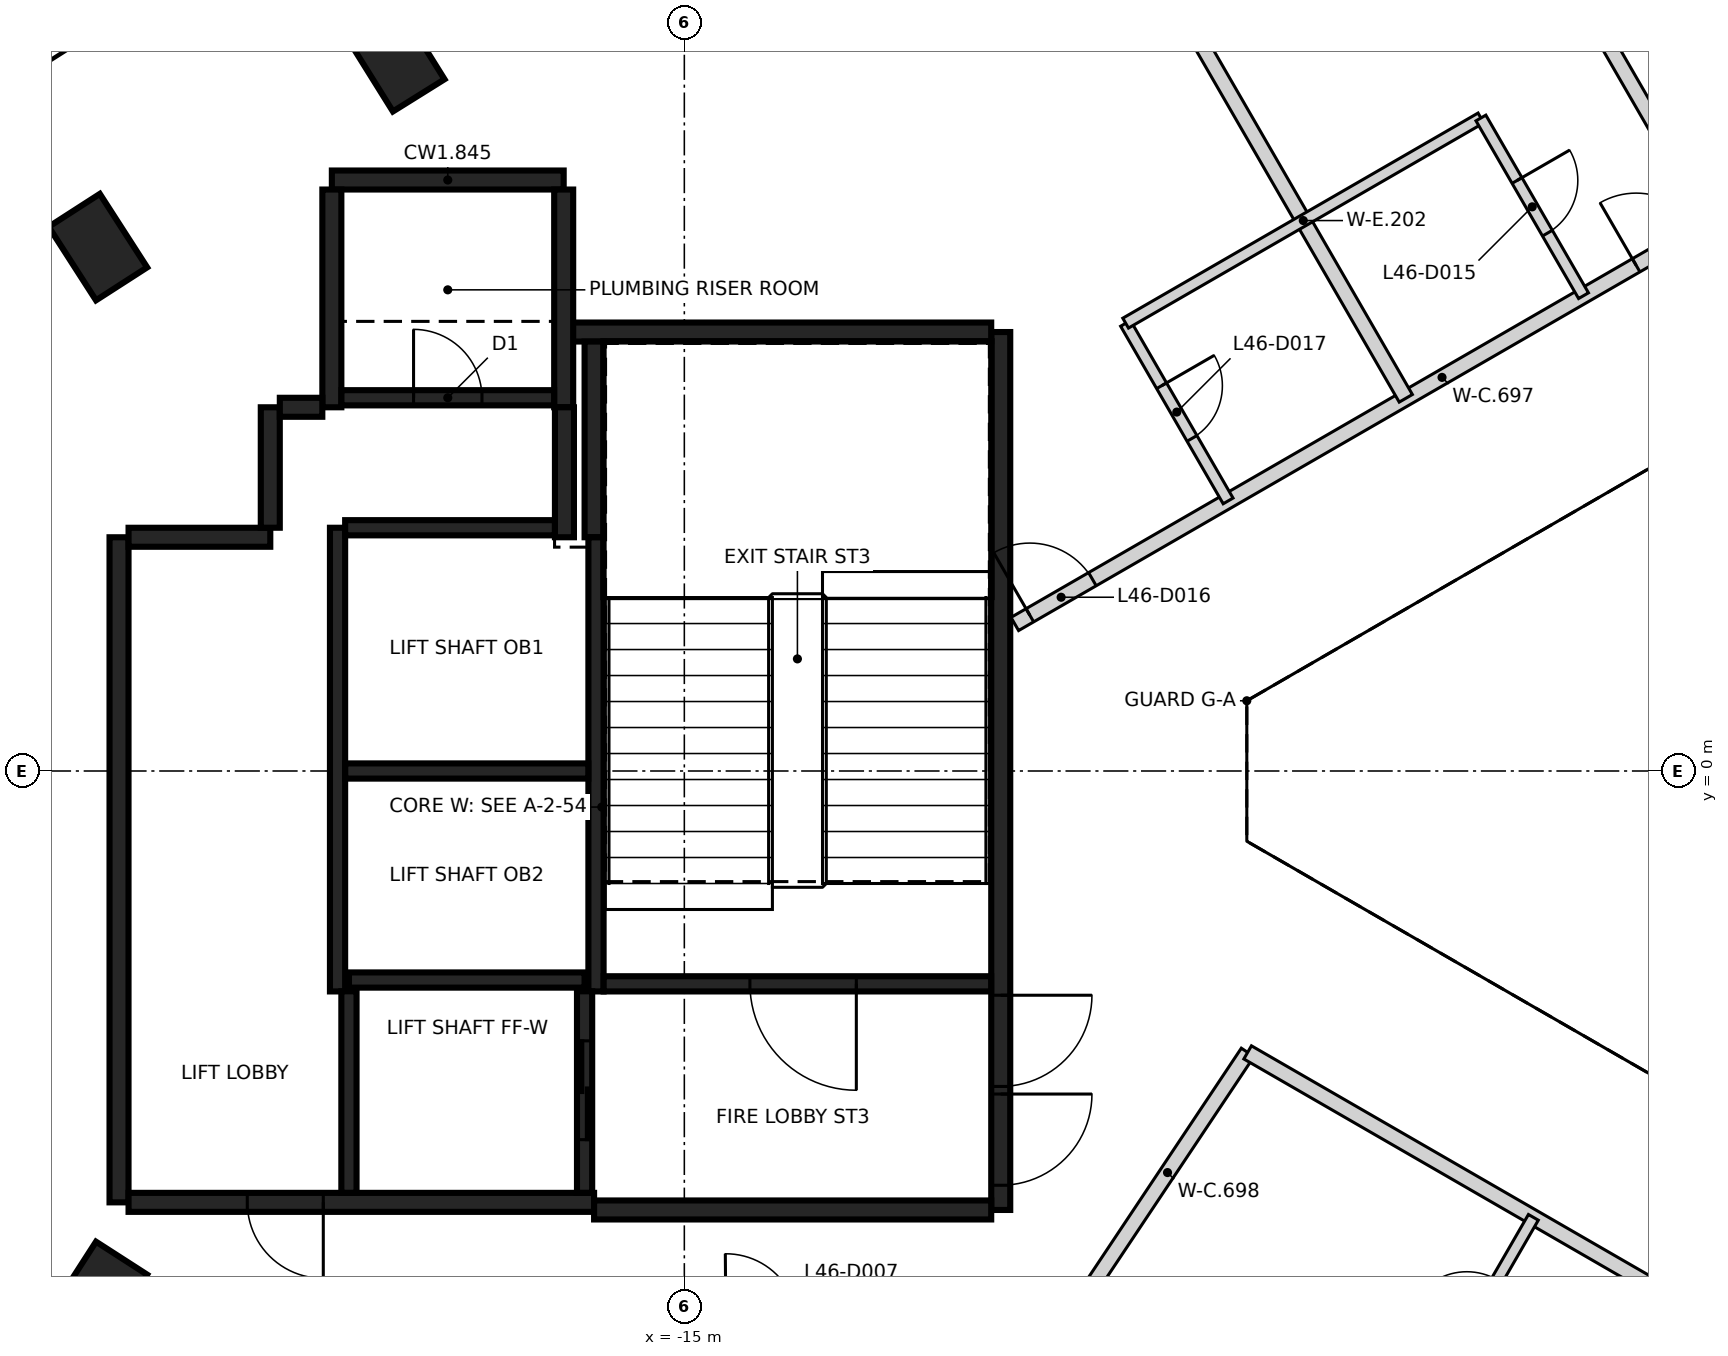
"""IFC4 building model, lengths in metres.
Left out: names, types, materials, properties, quantities, classifications, styles, units other than length and angle.
Written with IfcOpenShell. Run it as: python <this file> out.ifc"""

import sys

from ifc_helpers import new_model, si_unit, direction, frame, frame_2d, origin, origin_2d, place, context, subcontext, project, spatial, rectangle, extrude, element, fill, save


model = new_model("IFC4")
c1 = context("Model", 3, precision=1e-05, world=origin(), true_north=direction((0.0, 1.0)))
c2 = subcontext(c1, "Body", "Model", "MODEL_VIEW")
j1 = project(units=[si_unit("LENGTHUNIT", "METRE"), si_unit("PLANEANGLEUNIT", "RADIAN")], contexts=[c1])
p1 = place(None, origin())
s1 = spatial("IfcSite", under=j1, at=p1, CompositionType="ELEMENT")
p2 = place(p1, origin())
s2 = spatial("IfcBuilding", under=s1, at=p2, CompositionType="ELEMENT")
p3 = place(p2, frame((0.0, 0.0, 186.4)))
s3 = spatial("IfcBuildingStorey", under=s2, at=p3, CompositionType="ELEMENT", Elevation=186.4)
for number, where, z_axis, x_axis in (
    (1, (-18.799, 9.376, -0.35), (0.0, 0.0, 1.0), (-0.529, 0.848, 0.0)),
    (2, (-22.715, 6.892, -0.35), (0.0, 0.0, 1.0), (-0.541, 0.841, 0.0)),
    (3, (-22.715, -6.892, -0.35), (0.0, 0.0, 1.0), (0.541, 0.841, 0.0)),
):
    element("IfcColumn", number, at=place(p3, frame(where, z_axis=z_axis, x_axis=x_axis)), inside=s3, PredefinedType="COLUMN", context=c2, shape_type="SweptSolid", body=[
        extrude(rectangle(XDim=1.15, YDim=0.8, at=origin_2d()), origin(), (0.0, 0.0, 1.0), 3.6),
    ])
p4 = place(p3, frame((-10.837, 5.775, 0.0), z_axis=(0.0, 0.0, 1.0), x_axis=(0.0, -1.0, 0.0)))
e4 = element("IfcWall", 4, at=p4, inside=s3, PredefinedType="SHEAR", context=c2, shape_type="SweptSolid", body=[
    extrude(rectangle(XDim=11.55, YDim=0.25, at=frame_2d((5.775, 0.0))), origin(), (0.0, 0.0, 1.0), 3.25),
])
p5 = place(p4, frame((10.025, 0.0, 0.0)))
e5 = element("IfcOpeningElement", 5, at=p5, cuts=e4, PredefinedType="OPENING", context=c2, shape_type="SweptSolid", body=[
    extrude(rectangle(XDim=1.2, YDim=2.1, at=frame_2d((0.6, 1.05))), frame((0.0, 0.135, 0.0), z_axis=(0.0, -1.0, 0.0), x_axis=(1.0, 0.0, 0.0)), (0.0, 0.0, 1.0), 0.27),
])
p6 = place(p4, frame((8.725, 0.0, 0.0)))
e6 = element("IfcOpeningElement", 6, at=p6, cuts=e4, PredefinedType="OPENING", context=c2, shape_type="SweptSolid", body=[
    extrude(rectangle(XDim=1.2, YDim=2.1, at=frame_2d((0.6, 1.05))), frame((0.0, 0.135, 0.0), z_axis=(0.0, -1.0, 0.0), x_axis=(1.0, 0.0, 0.0)), (0.0, 0.0, 1.0), 0.27),
])
p7 = place(p3, frame((-22.437, -5.675, 0.0), z_axis=(0.0, 0.0, 1.0), x_axis=(0.0, 1.0, 0.0)))
e7 = element("IfcWall", 7, at=p7, inside=s3, PredefinedType="SHEAR", context=c2, shape_type="SweptSolid", body=[
    extrude(rectangle(XDim=8.75, YDim=0.25, at=frame_2d((4.375, 0.0))), origin(), (0.0, 0.0, 1.0), 3.25),
])
p8 = place(p3, frame((-16.187, -5.675, 0.0), z_axis=(0.0, 0.0, 1.0), x_axis=(-1.0, 0.0, 0.0)))
e8 = element("IfcWall", 8, at=p8, inside=s3, PredefinedType="SHEAR", context=c2, shape_type="SweptSolid", body=[
    extrude(rectangle(XDim=6.125, YDim=0.25, at=frame_2d((3.062, 0.0))), origin(), (0.0, 0.0, 1.0), 3.25),
])
p9 = place(p8, frame((3.563, 0.0, 0.0)))
e9 = element("IfcOpeningElement", 9, at=p9, cuts=e8, PredefinedType="OPENING", context=c2, shape_type="SweptSolid", body=[
    extrude(rectangle(XDim=1.0, YDim=2.1, at=frame_2d((0.5, 1.05))), frame((0.0, 0.135, 0.0), z_axis=(0.0, -1.0, 0.0), x_axis=(1.0, 0.0, 0.0)), (0.0, 0.0, 1.0), 0.27),
])
p10 = place(p3, frame((-10.963, -5.775, 0.0), z_axis=(0.0, 0.0, 1.0), x_axis=(-1.0, 0.0, 0.0)))
e10 = element("IfcWall", 10, at=p10, inside=s3, PredefinedType="SHEAR", context=c2, shape_type="SweptSolid", body=[
    extrude(rectangle(XDim=5.225, YDim=0.25, at=frame_2d((2.612, 0.0))), origin(), (0.0, 0.0, 1.0), 3.25),
])
p11 = place(p3, frame((-16.472, 5.775, 0.0), z_axis=(0.0, 0.0, 1.0), x_axis=(1.0, 0.0, 0.0)))
e11 = element("IfcWall", 11, at=p11, inside=s3, PredefinedType="SHEAR", context=c2, shape_type="SweptSolid", body=[
    extrude(rectangle(XDim=5.51, YDim=0.25, at=frame_2d((2.755, 0.0))), origin(), (0.0, 0.0, 1.0), 3.25),
])
p12 = place(p3, frame((-19.637, 7.775, 0.0), z_axis=(0.0, 0.0, 1.0), x_axis=(1.0, 0.0, 0.0)))
e12 = element("IfcWall", 12, at=p12, inside=s3, PredefinedType="SHEAR", context=c2, shape_type="SweptSolid", body=[
    extrude(rectangle(XDim=3.05, YDim=0.25, at=frame_2d((1.525, 0.0))), origin(), (0.0, 0.0, 1.0), 3.25),
])
for number, where, z_axis, x_axis in (
    (13, (-16.587, 7.65, 0.0), (0.0, 0.0, 1.0), (0.0, -1.0, 0.0)),
    (14, (-19.637, 4.785, 0.0), (0.0, 0.0, 1.0), (0.0, 1.0, 0.0)),
):
    element("IfcWall", number, at=place(p3, frame(where, z_axis=z_axis, x_axis=x_axis)), inside=s3, PredefinedType="SHEAR", context=c2, shape_type="SweptSolid", body=[
        extrude(rectangle(XDim=2.865, YDim=0.25, at=frame_2d((1.432, 0.0))), origin(), (0.0, 0.0, 1.0), 3.25),
    ])
p13 = place(p3, frame((-16.187, 3.075, 0.0), z_axis=(0.0, 0.0, 1.0), x_axis=(0.0, 1.0, 0.0)))
e15 = element("IfcWall", 15, at=p13, inside=s3, PredefinedType="SHEAR", context=c2, shape_type="SweptSolid", body=[
    extrude(rectangle(XDim=2.575, YDim=0.25, at=frame_2d((1.287, 0.0))), origin(), (0.0, 0.0, 1.0), 3.25),
])
p14 = place(p3, frame((-22.312, 3.075, 0.0), z_axis=(0.0, 0.0, 1.0), x_axis=(1.0, 0.0, 0.0)))
e16 = element("IfcWall", 16, at=p14, inside=s3, PredefinedType="SHEAR", context=c2, shape_type="SweptSolid", body=[
    extrude(rectangle(XDim=1.865, YDim=0.25, at=frame_2d((0.932, 0.0))), origin(), (0.0, 0.0, 1.0), 3.25),
])
p15 = place(p3, frame((-16.577, 4.785, 0.0), z_axis=(0.0, 0.0, 1.0), x_axis=(0.0, -1.0, 0.0)))
e17 = element("IfcWall", 17, at=p15, inside=s3, PredefinedType="SHEAR", context=c2, shape_type="SweptSolid", body=[
    extrude(rectangle(XDim=1.71, YDim=0.25, at=frame_2d((0.855, 0.0))), origin(), (0.0, 0.0, 1.0), 3.25),
])
p16 = place(p3, frame((-20.447, 3.2, 0.0), z_axis=(0.0, 0.0, 1.0), x_axis=(0.0, 1.0, 0.0)))
e18 = element("IfcWall", 18, at=p16, inside=s3, PredefinedType="SHEAR", context=c2, shape_type="SweptSolid", body=[
    extrude(rectangle(XDim=1.584, YDim=0.25, at=frame_2d((0.792, 0.0))), origin(), (0.0, 0.0, 1.0), 3.25),
])
p17 = place(p3, frame((-20.322, 4.785, 0.0), z_axis=(0.0, 0.0, 1.0), x_axis=(1.0, 0.0, 0.0)))
e19 = element("IfcWall", 19, at=p17, inside=s3, PredefinedType="SHEAR", context=c2, shape_type="SweptSolid", body=[
    extrude(rectangle(XDim=0.559, YDim=0.25, at=frame_2d((0.28, 0.0))), origin(), (0.0, 0.0, 1.0), 3.25),
])
p18 = place(p3, frame((-16.162, 3.074, 0.0), z_axis=(0.0, 0.0, 1.0), x_axis=(0.0, -1.0, 0.0)))
e20 = element("IfcWall", 20, at=p18, inside=s3, PredefinedType="SHEAR", context=c2, shape_type="SweptSolid", body=[
    extrude(rectangle(XDim=5.974, YDim=0.2, at=frame_2d((2.987, 0.0))), origin(), (0.0, 0.0, 1.0), 3.25),
])
p19 = place(p3, frame((-19.562, -2.9, 0.0), z_axis=(0.0, 0.0, 1.0), x_axis=(0.0, 1.0, 0.0)))
e21 = element("IfcWall", 21, at=p19, inside=s3, PredefinedType="SHEAR", context=c2, shape_type="SweptSolid", body=[
    extrude(rectangle(XDim=6.1, YDim=0.2, at=frame_2d((3.05, 0.0))), origin(), (0.0, 0.0, 1.0), 3.25),
])
p20 = place(p3, frame((-10.963, -2.8, 0.0), z_axis=(0.0, 0.0, 1.0), x_axis=(-1.0, 0.0, 0.0)))
e22 = element("IfcWall", 22, at=p20, inside=s3, PredefinedType="SHEAR", context=c2, shape_type="SweptSolid", body=[
    extrude(rectangle(XDim=5.098, YDim=0.2, at=frame_2d((2.549, 0.0))), origin(), (0.0, 0.0, 1.0), 3.25),
])
p21 = place(p20, frame((1.774, 0.0, 0.0)))
e23 = element("IfcOpeningElement", 23, at=p21, cuts=e22, PredefinedType="OPENING", context=c2, shape_type="SweptSolid", body=[
    extrude(rectangle(XDim=1.4, YDim=2.1, at=frame_2d((0.7, 1.05))), frame((0.0, 0.11, 0.0), z_axis=(0.0, -1.0, 0.0), x_axis=(1.0, 0.0, 0.0)), (0.0, 0.0, 1.0), 0.22),
])
p22 = place(p3, frame((-16.263, 0.0, 0.0), z_axis=(0.0, 0.0, 1.0), x_axis=(-1.0, 0.0, 0.0)))
e24 = element("IfcWall", 24, at=p22, inside=s3, PredefinedType="SHEAR", context=c2, shape_type="SweptSolid", body=[
    extrude(rectangle(XDim=3.198, YDim=0.2, at=frame_2d((1.599, 0.0))), origin(), (0.0, 0.0, 1.0), 3.25),
])
p23 = place(p3, frame((-19.511, 4.91, 0.0), z_axis=(0.0, 0.0, 1.0), x_axis=(1.0, 0.0, 0.0)))
e25 = element("IfcWall", 25, at=p23, inside=s3, PredefinedType="SHEAR", context=c2, shape_type="SweptSolid", body=[
    extrude(rectangle(XDim=2.798, YDim=0.2, at=frame_2d((1.399, 0.0))), origin(), (0.0, 0.0, 1.0), 3.25),
])
p24 = place(p23, frame((0.949, 0.0, 0.0)))
e26 = element("IfcOpeningElement", 26, at=p24, cuts=e25, PredefinedType="OPENING", context=c2, shape_type="SweptSolid", body=[
    extrude(rectangle(XDim=0.9, YDim=2.1, at=frame_2d((0.45, 1.05))), frame((0.0, 0.11, 0.0), z_axis=(0.0, -1.0, 0.0), x_axis=(1.0, 0.0, 0.0)), (0.0, 0.0, 1.0), 0.22),
])
p25 = place(p3, frame((-19.462, 3.2, 0.0), z_axis=(0.0, 0.0, 1.0), x_axis=(1.0, 0.0, 0.0)))
e27 = element("IfcWall", 27, at=p25, inside=s3, PredefinedType="SHEAR", context=c2, shape_type="SweptSolid", body=[
    extrude(rectangle(XDim=2.759, YDim=0.2, at=frame_2d((1.379, 0.0))), origin(), (0.0, 0.0, 1.0), 3.25),
])
p26 = place(p3, frame((-19.412, -2.75, 0.0), z_axis=(0.0, 0.0, 1.0), x_axis=(1.0, 0.0, 0.0)))
e28 = element("IfcWall", 28, at=p26, inside=s3, PredefinedType="SHEAR", context=c2, shape_type="SweptSolid", body=[
    extrude(rectangle(XDim=3.1, YDim=0.2, at=frame_2d((1.55, 0.0))), origin(), (0.0, 0.0, 1.0), 3.25),
])
p27 = place(p3, frame((-16.312, -2.898, 0.0), z_axis=(0.0, 0.0, 1.0), x_axis=(0.0, -1.0, 0.0)))
e29 = element("IfcWall", 29, at=p27, inside=s3, PredefinedType="SHEAR", context=c2, shape_type="SweptSolid", body=[
    extrude(rectangle(XDim=2.651, YDim=0.2, at=frame_2d((1.325, 0.0))), origin(), (0.0, 0.0, 1.0), 3.25),
])
p28 = place(p27, frame((0.652, 0.0, 0.0)))
e30 = element("IfcOpeningElement", 30, at=p28, cuts=e29, PredefinedType="OPENING", context=c2, shape_type="SweptSolid", body=[
    extrude(rectangle(XDim=1.3, YDim=2.1, at=frame_2d((0.65, 1.05))), frame((0.0, 0.11, 0.0), z_axis=(0.0, -1.0, 0.0), x_axis=(1.0, 0.0, 0.0)), (0.0, 0.0, 1.0), 0.22),
])
p29 = place(p3, frame((-19.412, -5.549, 0.0), z_axis=(0.0, 0.0, 1.0), x_axis=(0.0, 1.0, 0.0)))
e31 = element("IfcWall", 31, at=p29, inside=s3, PredefinedType="SHEAR", context=c2, shape_type="SweptSolid", body=[
    extrude(rectangle(XDim=2.651, YDim=0.2, at=frame_2d((1.325, 0.0))), origin(), (0.0, 0.0, 1.0), 3.25),
])
p30 = place(p3, frame((-10.652, 1.934, 0.0), z_axis=(0.0, 0.0, 1.0), x_axis=(0.866066882415, 0.499928150021, 0.0)))
e32 = element("IfcWall", 32, at=p30, inside=s3, PredefinedType="PARTITIONING", context=c2, shape_type="SweptSolid", body=[
    extrude(rectangle(XDim=12.98, YDim=0.2, at=frame_2d((6.49, 0.0))), origin(), (0.0, 0.0, 1.0), 3.25),
])
p31 = place(p30, frame((9.439, 0.0, 0.0)))
e33 = element("IfcOpeningElement", 33, at=p31, cuts=e32, PredefinedType="OPENING", context=c2, shape_type="SweptSolid", body=[
    extrude(rectangle(XDim=0.95, YDim=2.1, at=frame_2d((0.475, 1.05))), frame((0.0, 0.11, 0.0), z_axis=(0.0, -1.0, 0.0), x_axis=(1.0, 0.0, 0.0)), (0.0, 0.0, 1.0), 0.22),
])
p32 = place(p30, frame((0.229, 0.0, 0.0)))
e34 = element("IfcOpeningElement", 34, at=p32, cuts=e32, PredefinedType="OPENING", context=c2, shape_type="SweptSolid", body=[
    extrude(rectangle(XDim=0.95, YDim=2.1, at=frame_2d((0.475, 1.05))), frame((0.0, 0.11, 0.0), z_axis=(0.0, -1.0, 0.0), x_axis=(1.0, 0.0, 0.0)), (0.0, 0.0, 1.0), 0.22),
])
p33 = place(p3, frame((-9.697, -6.864, 0.0), z_axis=(0.0, 0.0, 1.0), x_axis=(0.554670545446, 0.832070060761, 0.0)))
e35 = element("IfcWall", 35, at=p33, inside=s3, PredefinedType="PARTITIONING", context=c2, shape_type="SweptSolid", body=[
    extrude(rectangle(XDim=3.8, YDim=0.2, at=frame_2d((1.9, 0.0))), origin(), (0.0, 0.0, 1.0), 3.25),
])
p34 = place(p3, frame((-7.589, -3.702, 0.0), z_axis=(0.0, 0.0, 1.0), x_axis=(0.86602490244, -0.500000868353, 0.0)))
e36 = element("IfcWall", 36, at=p34, inside=s3, PredefinedType="PARTITIONING", context=c2, shape_type="SweptSolid", body=[
    extrude(rectangle(XDim=12.98, YDim=0.2, at=frame_2d((6.49, 0.0))), origin(), (0.0, 0.0, 1.0), 3.25),
])
p35 = place(p34, frame((11.8, 0.0, 0.0)))
e37 = element("IfcOpeningElement", 37, at=p35, cuts=e36, PredefinedType="OPENING", context=c2, shape_type="SweptSolid", body=[
    extrude(rectangle(XDim=0.95, YDim=2.1, at=frame_2d((0.475, 1.05))), frame((0.0, 0.11, 0.0), z_axis=(0.0, -1.0, 0.0), x_axis=(1.0, 0.0, 0.0)), (0.0, 0.0, 1.0), 0.22),
])
p36 = place(p3, frame((-12.067, 16.263, 0.0), z_axis=(0.0, 0.0, 1.0), x_axis=(0.500016190239, -0.866016056144, 0.0)))
e38 = element("IfcWall", 38, at=p36, inside=s3, PredefinedType="PARTITIONING", context=c2, shape_type="SweptSolid", body=[
    extrude(rectangle(XDim=13.118, YDim=0.2, at=frame_2d((6.559, 0.0))), origin(), (0.0, 0.0, 1.0), 3.25),
])
p37 = place(p3, frame((-8.052, 18.582, 0.0), z_axis=(0.0, 0.0, 1.0), x_axis=(0.500046266189, -0.86599869034, 0.0)))
e39 = element("IfcWall", 39, at=p37, inside=s3, PredefinedType="PARTITIONING", context=c2, shape_type="SweptSolid", body=[
    extrude(rectangle(XDim=13.118, YDim=0.2, at=frame_2d((6.559, 0.0))), origin(), (0.0, 0.0, 1.0), 3.25),
])
p38 = place(p3, frame((-9.195, 5.889, 0.0), z_axis=(0.0, 0.0, 1.0), x_axis=(0.500129820725, -0.865950438779, 0.0)))
e40 = element("IfcWall", 40, at=p38, inside=s3, PredefinedType="PARTITIONING", context=c2, shape_type="SweptSolid", body=[
    extrude(rectangle(XDim=2.698, YDim=0.15, at=frame_2d((1.349, 0.0))), origin(), (0.0, 0.0, 1.0), 3.25),
])
p39 = place(p38, frame((0.948, 0.0, 0.0)))
e41 = element("IfcOpeningElement", 41, at=p39, cuts=e40, PredefinedType="OPENING", context=c2, shape_type="SweptSolid", body=[
    extrude(rectangle(XDim=0.8, YDim=2.1, at=frame_2d((0.4, 1.05))), frame((0.0, 0.085, 0.0), z_axis=(0.0, -1.0, 0.0), x_axis=(1.0, 0.0, 0.0)), (0.0, 0.0, 1.0), 0.17),
])
p40 = place(p3, frame((-9.194, 5.892, 0.0), z_axis=(0.0, 0.0, 1.0), x_axis=(0.8659934935, 0.500055266161, 0.0)))
e42 = element("IfcWall", 42, at=p40, inside=s3, PredefinedType="PARTITIONING", context=c2, shape_type="SweptSolid", body=[
    extrude(rectangle(XDim=5.397, YDim=0.15, at=frame_2d((2.699, 0.0))), origin(), (0.0, 0.0, 1.0), 3.25),
])
p41 = place(p3, frame((-5.179, -8.208, 0.0), z_axis=(0.0, 0.0, 1.0), x_axis=(0.500061949227, 0.865989634427, 0.0)))
e43 = element("IfcWall", 43, at=p41, inside=s3, PredefinedType="PARTITIONING", context=c2, shape_type="SweptSolid", body=[
    extrude(rectangle(XDim=2.698, YDim=0.15, at=frame_2d((1.349, 0.0))), origin(), (0.0, 0.0, 1.0), 3.25),
])
p42 = place(p41, frame((0.948, 0.0, 0.0)))
e44 = element("IfcOpeningElement", 44, at=p42, cuts=e43, PredefinedType="OPENING", context=c2, shape_type="SweptSolid", body=[
    extrude(rectangle(XDim=0.8, YDim=2.1, at=frame_2d((0.4, 1.05))), frame((0.0, 0.085, 0.0), z_axis=(0.0, -1.0, 0.0), x_axis=(1.0, 0.0, 0.0)), (0.0, 0.0, 1.0), 0.17),
])
p43 = place(p3, frame((-4.52, 8.591, 0.0), z_axis=(0.0, 0.0, 1.0), x_axis=(0.500048589285, -0.86599734893, 0.0)))
e45 = element("IfcWall", 45, at=p43, inside=s3, PredefinedType="PARTITIONING", context=c2, shape_type="SweptSolid", body=[
    extrude(rectangle(XDim=2.7, YDim=0.15, at=frame_2d((1.35, 0.0))), origin(), (0.0, 0.0, 1.0), 3.25),
])
p44 = place(p43, frame((0.95, 0.0, 0.0)))
e46 = element("IfcOpeningElement", 46, at=p44, cuts=e45, PredefinedType="OPENING", context=c2, shape_type="SweptSolid", body=[
    extrude(rectangle(XDim=0.8, YDim=2.1, at=frame_2d((0.4, 1.05))), frame((0.0, 0.085, 0.0), z_axis=(0.0, -1.0, 0.0), x_axis=(1.0, 0.0, 0.0)), (0.0, 0.0, 1.0), 0.17),
])
p45 = place(p28, origin())
e47 = element("IfcDoor", 47, at=p45, inside=s3, OperationType="SLIDING_TO_LEFT", PredefinedType="DOOR", context=c2, shape_type="SweptSolid", body=[
    extrude(rectangle(XDim=1.3, YDim=2.1, at=frame_2d((0.65, 1.05))), frame((0.0, 0.025, 0.0), z_axis=(0.0, -1.0, 0.0), x_axis=(1.0, 0.0, 0.0)), (0.0, 0.0, 1.0), 0.05),
])
fill(e30, e47)
p46 = place(p9, origin())
e48 = element("IfcDoor", 48, at=p46, inside=s3, OperationType="SINGLE_SWING_LEFT", PredefinedType="DOOR", context=c2, shape_type="SweptSolid", body=[
    extrude(rectangle(XDim=1.0, YDim=2.1, at=frame_2d((0.5, 1.05))), frame((0.0, 0.025, 0.0), z_axis=(0.0, -1.0, 0.0), x_axis=(1.0, 0.0, 0.0)), (0.0, 0.0, 1.0), 0.05),
])
fill(e9, e48)
p47 = place(p5, origin())
e49 = element("IfcDoor", 49, at=p47, inside=s3, OperationType="SINGLE_SWING_LEFT", PredefinedType="DOOR", context=c2, shape_type="SweptSolid", body=[
    extrude(rectangle(XDim=1.2, YDim=2.1, at=frame_2d((0.6, 1.05))), frame((0.0, 0.025, 0.0), z_axis=(0.0, -1.0, 0.0), x_axis=(1.0, 0.0, 0.0)), (0.0, 0.0, 1.0), 0.05),
])
fill(e5, e49)
p48 = place(p6, origin())
e50 = element("IfcDoor", 50, at=p48, inside=s3, OperationType="SINGLE_SWING_RIGHT", PredefinedType="DOOR", context=c2, shape_type="SweptSolid", body=[
    extrude(rectangle(XDim=1.2, YDim=2.1, at=frame_2d((0.6, 1.05))), frame((0.0, 0.025, 0.0), z_axis=(0.0, -1.0, 0.0), x_axis=(1.0, 0.0, 0.0)), (0.0, 0.0, 1.0), 0.05),
])
fill(e6, e50)
p49 = place(p21, origin())
e51 = element("IfcDoor", 51, at=p49, inside=s3, OperationType="SINGLE_SWING_LEFT", PredefinedType="DOOR", context=c2, shape_type="SweptSolid", body=[
    extrude(rectangle(XDim=1.4, YDim=2.1, at=frame_2d((0.7, 1.05))), frame((0.0, 0.025, 0.0), z_axis=(0.0, -1.0, 0.0), x_axis=(1.0, 0.0, 0.0)), (0.0, 0.0, 1.0), 0.05),
])
fill(e23, e51)
p50 = place(p24, origin())
e52 = element("IfcDoor", 52, at=p50, inside=s3, OperationType="SINGLE_SWING_RIGHT", PredefinedType="DOOR", context=c2, shape_type="SweptSolid", body=[
    extrude(rectangle(XDim=0.9, YDim=2.1, at=frame_2d((0.45, 1.05))), frame((0.0, 0.025, 0.0), z_axis=(0.0, -1.0, 0.0), x_axis=(1.0, 0.0, 0.0)), (0.0, 0.0, 1.0), 0.05),
])
fill(e26, e52)
p51 = place(p31, origin())
e53 = element("IfcDoor", 53, at=p51, inside=s3, OperationType="SINGLE_SWING_LEFT", PredefinedType="DOOR", context=c2, shape_type="SweptSolid", body=[
    extrude(rectangle(XDim=0.95, YDim=2.1, at=frame_2d((0.475, 1.05))), frame((0.0, 0.025, 0.0), z_axis=(0.0, -1.0, 0.0), x_axis=(1.0, 0.0, 0.0)), (0.0, 0.0, 1.0), 0.05),
])
fill(e33, e53)
p52 = place(p44, frame((0.8, 0.0, 0.0), z_axis=(0.0, 0.0, 1.0), x_axis=(-1.0, 0.0, 0.0)))
e54 = element("IfcDoor", 54, at=p52, inside=s3, OperationType="SINGLE_SWING_LEFT", PredefinedType="DOOR", context=c2, shape_type="SweptSolid", body=[
    extrude(rectangle(XDim=0.8, YDim=2.1, at=frame_2d((0.4, 1.05))), frame((0.0, 0.025, 0.0), z_axis=(0.0, -1.0, 0.0), x_axis=(1.0, 0.0, 0.0)), (0.0, 0.0, 1.0), 0.05),
])
fill(e46, e54)
p53 = place(p32, origin())
e55 = element("IfcDoor", 55, at=p53, inside=s3, OperationType="SINGLE_SWING_LEFT", PredefinedType="DOOR", context=c2, shape_type="SweptSolid", body=[
    extrude(rectangle(XDim=0.95, YDim=2.1, at=frame_2d((0.475, 1.05))), frame((0.0, 0.025, 0.0), z_axis=(0.0, -1.0, 0.0), x_axis=(1.0, 0.0, 0.0)), (0.0, 0.0, 1.0), 0.05),
])
fill(e34, e55)
p54 = place(p39, frame((0.8, 0.0, 0.0), z_axis=(0.0, 0.0, 1.0), x_axis=(-1.0, 0.0, 0.0)))
e56 = element("IfcDoor", 56, at=p54, inside=s3, OperationType="SINGLE_SWING_LEFT", PredefinedType="DOOR", context=c2, shape_type="SweptSolid", body=[
    extrude(rectangle(XDim=0.8, YDim=2.1, at=frame_2d((0.4, 1.05))), frame((0.0, 0.025, 0.0), z_axis=(0.0, -1.0, 0.0), x_axis=(1.0, 0.0, 0.0)), (0.0, 0.0, 1.0), 0.05),
])
fill(e41, e56)
save(model, sys.argv[1])
